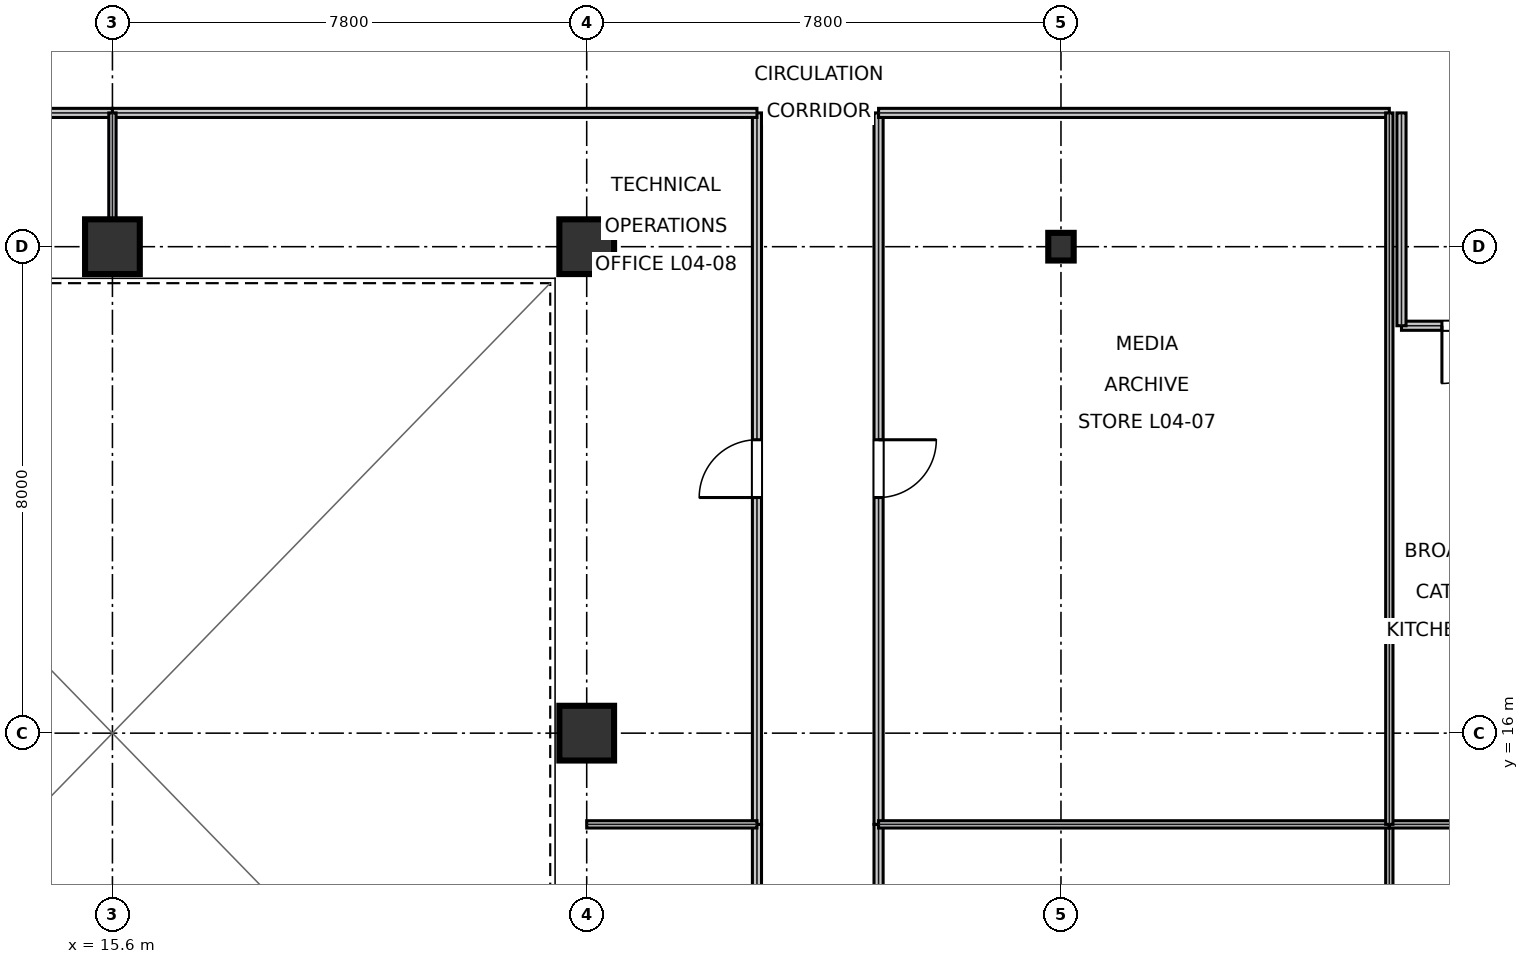
"""IFC4 building model, lengths in metres.
Left out: names, types, materials, properties, quantities, classifications, styles, units other than length and angle.
Written with IfcOpenShell. Run it as: python <this file> out.ifc"""

import sys

from ifc_helpers import new_model, si_unit, direction, frame, frame_2d, origin, origin_2d, place, context, subcontext, project, spatial, rectangle, i_section, extrude, element, fill, save


model = new_model("IFC4")
c1 = context("Model", 3, precision=1e-05, world=origin(), true_north=direction((0.0, 1.0)))
c2 = subcontext(c1, "Body", "Model", "MODEL_VIEW")
j1 = project(units=[si_unit("LENGTHUNIT", "METRE"), si_unit("PLANEANGLEUNIT", "RADIAN")], contexts=[c1])
p1 = place(None, origin())
s1 = spatial("IfcSite", under=j1, at=p1, CompositionType="ELEMENT")
p2 = place(p1, origin())
s2 = spatial("IfcBuilding", under=s1, at=p2, CompositionType="ELEMENT")
p3 = place(p2, frame((0.0, 0.0, 21.6)))
s3 = spatial("IfcBuildingStorey", under=s2, at=p3, CompositionType="ELEMENT", Elevation=21.6)
for number, where, z_axis, x_axis in (
    (1, (15.6, 24.0, 0.0), (0.0, 0.0, 1.0), (1.0, 0.0, 0.0)),
    (2, (23.4, 16.0, 0.0), (0.0, 0.0, 1.0), (1.0, 0.0, 0.0)),
    (3, (23.4, 24.0, 0.0), (0.0, 0.0, 1.0), (1.0, 0.0, 0.0)),
):
    element("IfcColumn", number, at=place(p3, frame(where, z_axis=z_axis, x_axis=x_axis)), inside=s3, PredefinedType="COLUMN", context=c2, shape_type="SweptSolid", body=[
        extrude(rectangle(XDim=0.9, YDim=0.9, at=origin_2d()), origin(), (0.0, 0.0, 1.0), 5.395),
    ])
p4 = place(p3, frame((31.2, 24.0, 0.0), z_axis=(0.0, 0.0, 1.0), x_axis=(1.0, 0.0, 0.0)))
e4 = element("IfcColumn", 4, at=p4, inside=s3, PredefinedType="COLUMN", context=c2, shape_type="SweptSolid", body=[
    extrude(i_section(OverallWidth=0.418, OverallDepth=0.455, WebThickness=0.042, FlangeThickness=0.068, at=origin_2d()), origin(), (0.0, 0.0, 1.0), 5.395),
])
p5 = place(p3, frame((26.2, 2.5, 0.0), z_axis=(0.0, 0.0, 1.0), x_axis=(0.0, 1.0, 0.0)))
e5 = element("IfcWall", 5, at=p5, inside=s3, PredefinedType="PARTITIONING", context=c2, shape_type="SweptSolid", body=[
    extrude(rectangle(XDim=12.0, YDim=0.15, at=frame_2d((6.0, 0.0))), origin(), (0.0, 0.0, 1.0), 4.298),
])
p6 = place(p5, frame((5.525, 0.0, 0.0)))
e6 = element("IfcOpeningElement", 6, at=p6, cuts=e5, PredefinedType="OPENING", context=c2, shape_type="SweptSolid", body=[
    extrude(rectangle(XDim=0.95, YDim=2.15, at=frame_2d((0.475, 1.075))), frame((0.0, 0.085, 0.0), z_axis=(0.0, -1.0, 0.0), x_axis=(1.0, 0.0, 0.0)), (0.0, 0.0, 1.0), 0.17),
])
p7 = place(p3, frame((28.2, 4.5, 0.0), z_axis=(0.0, 0.0, 1.0), x_axis=(0.0, 1.0, 0.0)))
e7 = element("IfcWall", 7, at=p7, inside=s3, PredefinedType="PARTITIONING", context=c2, shape_type="SweptSolid", body=[
    extrude(rectangle(XDim=10.0, YDim=0.15, at=frame_2d((5.0, 0.0))), origin(), (0.0, 0.0, 1.0), 4.298),
])
p8 = place(p7, frame((4.525, 0.0, 0.0)))
e8 = element("IfcOpeningElement", 8, at=p8, cuts=e7, PredefinedType="OPENING", context=c2, shape_type="SweptSolid", body=[
    extrude(rectangle(XDim=0.95, YDim=2.15, at=frame_2d((0.475, 1.075))), frame((0.0, 0.085, 0.0), z_axis=(0.0, -1.0, 0.0), x_axis=(1.0, 0.0, 0.0)), (0.0, 0.0, 1.0), 0.17),
])
p9 = place(p3, frame((36.8, 22.7, 0.0), z_axis=(0.0, 0.0, 1.0), x_axis=(1.0, 0.0, 0.0)))
e9 = element("IfcWall", 9, at=p9, inside=s3, PredefinedType="PARTITIONING", context=c2, shape_type="SweptSolid", body=[
    extrude(rectangle(XDim=2.28, YDim=0.15, at=frame_2d((1.14, 0.0))), origin(), (0.0, 0.0, 1.0), 4.375),
])
p10 = place(p9, frame((0.665, 0.0, 0.0)))
e10 = element("IfcOpeningElement", 10, at=p10, cuts=e9, PredefinedType="OPENING", context=c2, shape_type="SweptSolid", body=[
    extrude(rectangle(XDim=0.95, YDim=2.15, at=frame_2d((0.475, 1.075))), frame((0.0, 0.085, 0.0), z_axis=(0.0, -1.0, 0.0), x_axis=(1.0, 0.0, 0.0)), (0.0, 0.0, 1.0), 0.17),
])
p11 = place(p3, frame((28.2, 14.5, 0.0), z_axis=(0.0, 0.0, 1.0), x_axis=(0.0, 1.0, 0.0)))
e11 = element("IfcWall", 11, at=p11, inside=s3, PredefinedType="PARTITIONING", context=c2, shape_type="SweptSolid", body=[
    extrude(rectangle(XDim=11.7, YDim=0.15, at=frame_2d((5.85, 0.0))), origin(), (0.0, 0.0, 1.0), 3.648),
])
p12 = place(p11, frame((5.375, 0.0, 0.0)))
e12 = element("IfcOpeningElement", 12, at=p12, cuts=e11, PredefinedType="OPENING", context=c2, shape_type="SweptSolid", body=[
    extrude(rectangle(XDim=0.95, YDim=2.15, at=frame_2d((0.475, 1.075))), frame((0.0, 0.085, 0.0), z_axis=(0.0, -1.0, 0.0), x_axis=(1.0, 0.0, 0.0)), (0.0, 0.0, 1.0), 0.17),
])
p13 = place(p3, frame((26.2, 14.5, 0.0), z_axis=(0.0, 0.0, 1.0), x_axis=(0.0, 1.0, 0.0)))
e13 = element("IfcWall", 13, at=p13, inside=s3, PredefinedType="PARTITIONING", context=c2, shape_type="SweptSolid", body=[
    extrude(rectangle(XDim=11.7, YDim=0.15, at=frame_2d((5.85, 0.0))), origin(), (0.0, 0.0, 1.0), 3.648),
])
p14 = place(p13, frame((5.375, 0.0, 0.0)))
e14 = element("IfcOpeningElement", 14, at=p14, cuts=e13, PredefinedType="OPENING", context=c2, shape_type="SweptSolid", body=[
    extrude(rectangle(XDim=0.95, YDim=2.15, at=frame_2d((0.475, 1.075))), frame((0.0, 0.085, 0.0), z_axis=(0.0, -1.0, 0.0), x_axis=(1.0, 0.0, 0.0)), (0.0, 0.0, 1.0), 0.17),
])
p15 = place(p3, frame((10.0, 26.2, 0.0), z_axis=(0.0, 0.0, 1.0), x_axis=(1.0, 0.0, 0.0)))
e15 = element("IfcWall", 15, at=p15, inside=s3, PredefinedType="PARTITIONING", context=c2, shape_type="SweptSolid", body=[
    extrude(rectangle(XDim=5.6, YDim=0.15, at=frame_2d((2.8, 0.0))), origin(), (0.0, 0.0, 1.0), 3.648),
])
p16 = place(p15, frame((2.325, 0.0, 0.0)))
e16 = element("IfcOpeningElement", 16, at=p16, cuts=e15, PredefinedType="OPENING", context=c2, shape_type="SweptSolid", body=[
    extrude(rectangle(XDim=0.95, YDim=2.15, at=frame_2d((0.475, 1.075))), frame((0.0, 0.085, 0.0), z_axis=(0.0, -1.0, 0.0), x_axis=(1.0, 0.0, 0.0)), (0.0, 0.0, 1.0), 0.17),
])
p17 = place(p3, frame((36.8, 22.7, 0.0), z_axis=(0.0, 0.0, 1.0), x_axis=(0.0, 1.0, 0.0)))
e17 = element("IfcWall", 17, at=p17, inside=s3, PredefinedType="PARTITIONING", context=c2, shape_type="SweptSolid", body=[
    extrude(rectangle(XDim=3.5, YDim=0.15, at=frame_2d((1.75, 0.0))), origin(), (0.0, 0.0, 1.0), 4.298),
])
p18 = place(p3, frame((28.2, 26.2, 0.0), z_axis=(0.0, 0.0, 1.0), x_axis=(1.0, 0.0, 0.0)))
e18 = element("IfcWall", 18, at=p18, inside=s3, PredefinedType="PARTITIONING", context=c2, shape_type="SweptSolid", body=[
    extrude(rectangle(XDim=8.4, YDim=0.15, at=frame_2d((4.2, 0.0))), origin(), (0.0, 0.0, 1.0), 4.375),
])
p19 = place(p3, frame((15.6, 26.2, 0.0), z_axis=(0.0, 0.0, 1.0), x_axis=(1.0, 0.0, 0.0)))
e19 = element("IfcWall", 19, at=p19, inside=s3, PredefinedType="PARTITIONING", context=c2, shape_type="SweptSolid", body=[
    extrude(rectangle(XDim=10.6, YDim=0.15, at=frame_2d((5.3, 0.0))), origin(), (0.0, 0.0, 1.0), 3.648),
])
p20 = place(p3, frame((23.4, 14.5, 0.0), z_axis=(0.0, 0.0, 1.0), x_axis=(1.0, 0.0, 0.0)))
e20 = element("IfcWall", 20, at=p20, inside=s3, PredefinedType="PARTITIONING", context=c2, shape_type="SweptSolid", body=[
    extrude(rectangle(XDim=2.8, YDim=0.12, at=frame_2d((1.4, 0.0))), origin(), (0.0, 0.0, 1.0), 5.08),
])
p21 = place(p3, frame((36.6, 4.5, 0.0), z_axis=(0.0, 0.0, 1.0), x_axis=(0.0, 1.0, 0.0)))
e21 = element("IfcWall", 21, at=p21, inside=s3, PredefinedType="PARTITIONING", context=c2, shape_type="SweptSolid", body=[
    extrude(rectangle(XDim=10.0, YDim=0.12, at=frame_2d((5.0, 0.0))), origin(), (0.0, 0.0, 1.0), 4.298),
])
p22 = place(p3, frame((28.2, 14.5, 0.0), z_axis=(0.0, 0.0, 1.0), x_axis=(1.0, 0.0, 0.0)))
e22 = element("IfcWall", 22, at=p22, inside=s3, PredefinedType="PARTITIONING", context=c2, shape_type="SweptSolid", body=[
    extrude(rectangle(XDim=8.4, YDim=0.12, at=frame_2d((4.2, 0.0))), origin(), (0.0, 0.0, 1.0), 3.648),
])
p23 = place(p3, frame((36.6, 14.5, 0.0), z_axis=(0.0, 0.0, 1.0), x_axis=(1.0, 0.0, 0.0)))
e23 = element("IfcWall", 23, at=p23, inside=s3, PredefinedType="PARTITIONING", context=c2, shape_type="SweptSolid", body=[
    extrude(rectangle(XDim=10.2, YDim=0.12, at=frame_2d((5.1, 0.0))), origin(), (0.0, 0.0, 1.0), 4.375),
])
p24 = place(p3, frame((36.6, 14.5, 0.0), z_axis=(0.0, 0.0, 1.0), x_axis=(0.0, 1.0, 0.0)))
e24 = element("IfcWall", 24, at=p24, inside=s3, PredefinedType="PARTITIONING", context=c2, shape_type="SweptSolid", body=[
    extrude(rectangle(XDim=11.7, YDim=0.12, at=frame_2d((5.85, 0.0))), origin(), (0.0, 0.0, 1.0), 3.648),
])
p25 = place(p3, frame((15.6, 24.0, 0.0), z_axis=(0.0, 0.0, 1.0), x_axis=(0.0, 1.0, 0.0)))
e25 = element("IfcWall", 25, at=p25, inside=s3, PredefinedType="PARTITIONING", context=c2, shape_type="SweptSolid", body=[
    extrude(rectangle(XDim=2.2, YDim=0.12, at=frame_2d((1.1, 0.0))), origin(), (0.0, 0.0, 1.0), 3.648),
])
p26 = place(p10, frame((0.95, 0.0, 0.0), z_axis=(0.0, 0.0, 1.0), x_axis=(-1.0, 0.0, 0.0)))
e26 = element("IfcDoor", 26, at=p26, inside=s3, OperationType="SINGLE_SWING_RIGHT", PredefinedType="DOOR", context=c2, shape_type="SweptSolid", body=[
    extrude(rectangle(XDim=0.95, YDim=2.15, at=frame_2d((0.475, 1.075))), frame((0.0, 0.025, 0.0), z_axis=(0.0, -1.0, 0.0), x_axis=(1.0, 0.0, 0.0)), (0.0, 0.0, 1.0), 0.05),
])
fill(e10, e26)
p27 = place(p12, frame((0.95, 0.0, 0.0), z_axis=(0.0, 0.0, 1.0), x_axis=(-1.0, 0.0, 0.0)))
e27 = element("IfcDoor", 27, at=p27, inside=s3, OperationType="SINGLE_SWING_LEFT", PredefinedType="DOOR", context=c2, shape_type="SweptSolid", body=[
    extrude(rectangle(XDim=0.95, YDim=2.15, at=frame_2d((0.475, 1.075))), frame((0.0, 0.025, 0.0), z_axis=(0.0, -1.0, 0.0), x_axis=(1.0, 0.0, 0.0)), (0.0, 0.0, 1.0), 0.05),
])
fill(e12, e27)
p28 = place(p14, origin())
e28 = element("IfcDoor", 28, at=p28, inside=s3, OperationType="SINGLE_SWING_LEFT", PredefinedType="DOOR", context=c2, shape_type="SweptSolid", body=[
    extrude(rectangle(XDim=0.95, YDim=2.15, at=frame_2d((0.475, 1.075))), frame((0.0, 0.025, 0.0), z_axis=(0.0, -1.0, 0.0), x_axis=(1.0, 0.0, 0.0)), (0.0, 0.0, 1.0), 0.05),
])
fill(e14, e28)
save(model, sys.argv[1])
